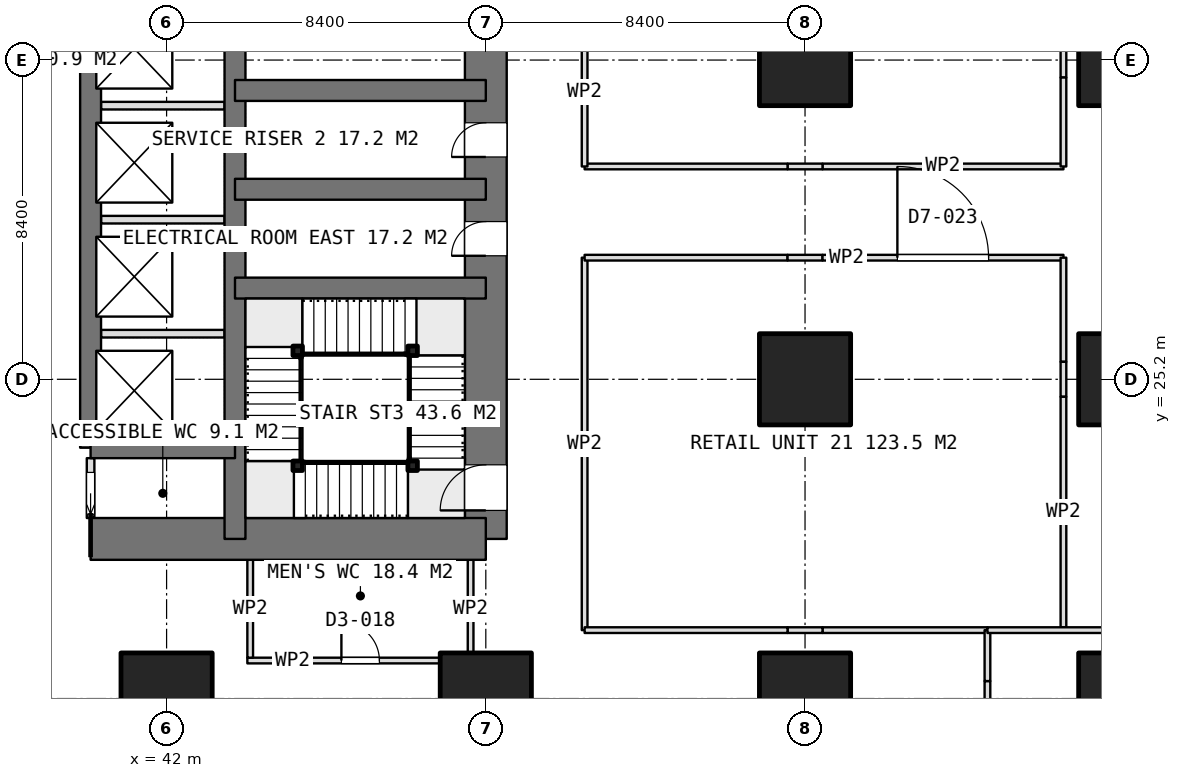
"""IFC4 building model, lengths in metres.
Left out: names, types, materials, properties, quantities, classifications, styles, units other than length and angle.
Written with IfcOpenShell. Run it as: python <this file> out.ifc"""

import sys

from ifc_helpers import new_model, si_unit, direction, frame, frame_2d, origin, origin_2d, place, context, subcontext, project, spatial, rectangle, extrude, element, fill, save


model = new_model("IFC4")
c1 = context("Model", 3, precision=1e-05, world=origin(), true_north=direction((0.0, 1.0)))
c2 = subcontext(c1, "Body", "Model", "MODEL_VIEW")
j1 = project(units=[si_unit("LENGTHUNIT", "METRE"), si_unit("PLANEANGLEUNIT", "RADIAN")], contexts=[c1])
p1 = place(None, origin())
s1 = spatial("IfcSite", under=j1, at=p1, CompositionType="ELEMENT")
p2 = place(p1, origin())
s2 = spatial("IfcBuilding", under=s1, at=p2, CompositionType="ELEMENT")
p3 = place(p2, frame((0.0, 0.0, 10.4)))
s3 = spatial("IfcBuildingStorey", under=s2, at=p3, CompositionType="ELEMENT", Elevation=10.4)
p4 = place(p3, frame((40.0, 21.0, 0.0), z_axis=(0.0, 0.0, 1.0), x_axis=(1.0, 0.0, 0.0)))
e1 = element("IfcWall", 1, at=p4, inside=s3, PredefinedType="SHEAR", context=c2, shape_type="SweptSolid", body=[
    extrude(rectangle(XDim=10.4, YDim=1.1, at=frame_2d((5.2, 0.0))), origin(), (0.0, 0.0, 1.0), 5.0),
])
p5 = place(p3, frame((50.4, 21.0, 0.0), z_axis=(0.0, 0.0, 1.0), x_axis=(0.0, 1.0, 0.0)))
e2 = element("IfcWall", 2, at=p5, inside=s3, PredefinedType="SHEAR", context=c2, shape_type="SweptSolid", body=[
    extrude(rectangle(XDim=25.2, YDim=1.1, at=frame_2d((12.6, 0.0))), origin(), (0.0, 0.0, 1.0), 5.0),
])
p6 = place(p5, frame((16.2, 0.0, 0.0)))
e3 = element("IfcOpeningElement", 3, at=p6, cuts=e2, PredefinedType="OPENING", context=c2, shape_type="SweptSolid", body=[
    extrude(rectangle(XDim=1.2, YDim=2.1, at=frame_2d((0.6, 1.05))), frame((0.0, 0.56, 0.0), z_axis=(0.0, -1.0, 0.0), x_axis=(1.0, 0.0, 0.0)), (0.0, 0.0, 1.0), 1.12),
])
p7 = place(p5, frame((10.05, 0.0, 0.0)))
e4 = element("IfcOpeningElement", 4, at=p7, cuts=e2, PredefinedType="OPENING", context=c2, shape_type="SweptSolid", body=[
    extrude(rectangle(XDim=0.9, YDim=2.1, at=frame_2d((0.45, 1.05))), frame((0.0, 0.56, 0.0), z_axis=(0.0, -1.0, 0.0), x_axis=(1.0, 0.0, 0.0)), (0.0, 0.0, 1.0), 1.12),
])
p8 = place(p5, frame((7.45, 0.0, 0.0)))
e5 = element("IfcOpeningElement", 5, at=p8, cuts=e2, PredefinedType="OPENING", context=c2, shape_type="SweptSolid", body=[
    extrude(rectangle(XDim=0.9, YDim=2.1, at=frame_2d((0.45, 1.05))), frame((0.0, 0.56, 0.0), z_axis=(0.0, -1.0, 0.0), x_axis=(1.0, 0.0, 0.0)), (0.0, 0.0, 1.0), 1.12),
])
p9 = place(p5, frame((0.75, 0.0, 0.0)))
e6 = element("IfcOpeningElement", 6, at=p9, cuts=e2, PredefinedType="OPENING", context=c2, shape_type="SweptSolid", body=[
    extrude(rectangle(XDim=1.2, YDim=2.1, at=frame_2d((0.6, 1.05))), frame((0.0, 0.56, 0.0), z_axis=(0.0, -1.0, 0.0), x_axis=(1.0, 0.0, 0.0)), (0.0, 0.0, 1.0), 1.12),
])
p10 = place(p3, frame((43.8, 21.0, 0.0), z_axis=(0.0, 0.0, 1.0), x_axis=(0.0, 1.0, 0.0)))
e7 = element("IfcWall", 7, at=p10, inside=s3, PredefinedType="SHEAR", context=c2, shape_type="SweptSolid", body=[
    extrude(rectangle(XDim=25.2, YDim=0.55, at=frame_2d((12.6, 0.0))), origin(), (0.0, 0.0, 1.0), 5.0),
])
p11 = place(p3, frame((40.0, 23.4, 0.0), z_axis=(0.0, 0.0, 1.0), x_axis=(0.0, 1.0, 0.0)))
e8 = element("IfcWall", 8, at=p11, inside=s3, PredefinedType="SHEAR", context=c2, shape_type="SweptSolid", body=[
    extrude(rectangle(XDim=18.0, YDim=0.55, at=frame_2d((9.0, 0.0))), origin(), (0.0, 0.0, 1.0), 5.0),
])
p12 = place(p3, frame((40.0, 23.4, 0.0), z_axis=(0.0, 0.0, 1.0), x_axis=(1.0, 0.0, 0.0)))
e9 = element("IfcWall", 9, at=p12, inside=s3, PredefinedType="SHEAR", context=c2, shape_type="SweptSolid", body=[
    extrude(rectangle(XDim=3.8, YDim=0.55, at=frame_2d((1.9, 0.0))), origin(), (0.0, 0.0, 1.0), 5.0),
])
for number, where, z_axis, x_axis in (
    (10, (43.8, 27.6, 0.0), (0.0, 0.0, 1.0), (1.0, 0.0, 0.0)),
    (11, (43.8, 30.2, 0.0), (0.0, 0.0, 1.0), (1.0, 0.0, 0.0)),
    (12, (43.8, 32.8, 0.0), (0.0, 0.0, 1.0), (1.0, 0.0, 0.0)),
):
    element("IfcWall", number, at=place(p3, frame(where, z_axis=z_axis, x_axis=x_axis)), inside=s3, PredefinedType="SHEAR", context=c2, shape_type="SweptSolid", body=[
        extrude(rectangle(XDim=6.6, YDim=0.55, at=frame_2d((3.3, 0.0))), origin(), (0.0, 0.0, 1.0), 5.0),
    ])
for number, where, z_axis, x_axis in (
    (13, (42.0, 16.8, 0.0), (0.0, 0.0, 1.0), (1.0, 0.0, 0.0)),
    (14, (50.4, 16.8, 0.0), (0.0, 0.0, 1.0), (1.0, 0.0, 0.0)),
    (15, (58.8, 16.8, 0.0), (0.0, 0.0, 1.0), (1.0, 0.0, 0.0)),
    (16, (58.8, 25.2, 0.0), (0.0, 0.0, 1.0), (1.0, 0.0, 0.0)),
    (17, (58.8, 33.6, 0.0), (0.0, 0.0, 1.0), (1.0, 0.0, 0.0)),
    (18, (67.2, 16.8, 0.0), (0.0, 0.0, 1.0), (1.0, 0.0, 0.0)),
    (19, (67.2, 25.2, 0.0), (0.0, 0.0, 1.0), (1.0, 0.0, 0.0)),
    (20, (67.2, 33.6, 0.0), (0.0, 0.0, 1.0), (1.0, 0.0, 0.0)),
):
    element("IfcColumn", number, at=place(p3, frame(where, z_axis=z_axis, x_axis=x_axis)), inside=s3, PredefinedType="COLUMN", context=c2, shape_type="SweptSolid", body=[
        extrude(rectangle(XDim=2.4, YDim=2.4, at=origin_2d()), origin(), (0.0, 0.0, 1.0), 5.0),
    ])
for number, where, z_axis, x_axis in (
    (21, (40.275, 26.4, 0.0), (0.0, 0.0, 1.0), (1.0, 0.0, 0.0)),
    (22, (40.275, 29.4, 0.0), (0.0, 0.0, 1.0), (1.0, 0.0, 0.0)),
    (23, (40.275, 32.4, 0.0), (0.0, 0.0, 1.0), (1.0, 0.0, 0.0)),
):
    element("IfcWall", number, at=place(p3, frame(where, z_axis=z_axis, x_axis=x_axis)), inside=s3, PredefinedType="PARTITIONING", context=c2, shape_type="SweptSolid", body=[
        extrude(rectangle(XDim=3.25, YDim=0.2, at=frame_2d((1.625, 0.0))), origin(), (0.0, 0.0, 1.0), 4.7),
    ])
p13 = place(p3, frame((40.0, 21.55, 0.0), z_axis=(0.0, 0.0, 1.0), x_axis=(0.0, 1.0, 0.0)))
e24 = element("IfcWall", 24, at=p13, inside=s3, PredefinedType="PARTITIONING", context=c2, shape_type="SweptSolid", body=[
    extrude(rectangle(XDim=1.575, YDim=0.2, at=frame_2d((0.788, 0.0))), origin(), (0.0, 0.0, 1.0), 4.7),
])
p14 = place(p13, frame((0.1, 0.0, 0.0)))
e25 = element("IfcOpeningElement", 25, at=p14, cuts=e24, PredefinedType="OPENING", context=c2, shape_type="SweptSolid", body=[
    extrude(rectangle(XDim=1.1, YDim=2.1, at=frame_2d((0.55, 1.05))), frame((0.0, 0.11, 0.0), z_axis=(0.0, -1.0, 0.0), x_axis=(1.0, 0.0, 0.0)), (0.0, 0.0, 1.0), 0.22),
])
p15 = place(p3, frame((44.125, 17.8, 0.0), z_axis=(0.0, 0.0, 1.0), x_axis=(1.0, 0.0, 0.0)))
e26 = element("IfcWall", 26, at=p15, inside=s3, PredefinedType="PARTITIONING", context=c2, shape_type="SweptSolid", body=[
    extrude(rectangle(XDim=5.95, YDim=0.15, at=frame_2d((2.975, 0.0))), origin(), (0.0, 0.0, 1.0), 4.7),
])
p16 = place(p15, frame((2.475, 0.0, 0.0)))
e27 = element("IfcOpeningElement", 27, at=p16, cuts=e26, PredefinedType="OPENING", context=c2, shape_type="SweptSolid", body=[
    extrude(rectangle(XDim=1.0, YDim=2.1, at=frame_2d((0.5, 1.05))), frame((0.0, 0.085, 0.0), z_axis=(0.0, -1.0, 0.0), x_axis=(1.0, 0.0, 0.0)), (0.0, 0.0, 1.0), 0.17),
])
for number, where, z_axis, x_axis in (
    (28, (44.2, 17.875, 0.0), (0.0, 0.0, 1.0), (0.0, 1.0, 0.0)),
    (29, (50.0, 17.875, 0.0), (0.0, 0.0, 1.0), (0.0, 1.0, 0.0)),
):
    element("IfcWall", number, at=place(p3, frame(where, z_axis=z_axis, x_axis=x_axis)), inside=s3, PredefinedType="PARTITIONING", context=c2, shape_type="SweptSolid", body=[
        extrude(rectangle(XDim=2.575, YDim=0.15, at=frame_2d((1.288, 0.0))), origin(), (0.0, 0.0, 1.0), 4.7),
    ])
p17 = place(p3, frame((63.6, 16.34, 0.0), z_axis=(0.0, 0.0, 1.0), x_axis=(0.0, 1.0, 0.0)))
e30 = element("IfcWall", 30, at=p17, inside=s3, PredefinedType="PARTITIONING", context=c2, shape_type="SweptSolid", body=[
    extrude(rectangle(XDim=0.92, YDim=0.15, at=frame_2d((0.46, 0.0))), origin(), (0.0, 0.0, 1.0), 2.9),
])
p18 = place(p3, frame((63.6, 17.26, 0.0), z_axis=(0.0, 0.0, 1.0), x_axis=(0.0, 1.0, 0.0)))
e31 = element("IfcWall", 31, at=p18, inside=s3, PredefinedType="PARTITIONING", context=c2, shape_type="SweptSolid", body=[
    extrude(rectangle(XDim=1.34, YDim=0.15, at=frame_2d((0.67, 0.0))), origin(), (0.0, 0.0, 1.0), 4.7),
])
p19 = place(p3, frame((63.6, 18.6, 0.0), z_axis=(0.0, 0.0, 1.0), x_axis=(1.0, 0.0, 0.0)))
e32 = element("IfcWall", 32, at=p19, inside=s3, PredefinedType="PARTITIONING", context=c2, shape_type="SweptSolid", body=[
    extrude(rectangle(XDim=3.14, YDim=0.15, at=frame_2d((1.57, 0.0))), origin(), (0.0, 0.0, 1.0), 4.7),
])
p20 = place(p3, frame((53.0, 18.6, 0.0), z_axis=(0.0, 0.0, 1.0), x_axis=(0.0, 1.0, 0.0)))
e33 = element("IfcWall", 33, at=p20, inside=s3, PredefinedType="PARTITIONING", context=c2, shape_type="SweptSolid", body=[
    extrude(rectangle(XDim=9.8, YDim=0.15, at=frame_2d((4.9, 0.0))), origin(), (0.0, 0.0, 1.0), 4.7),
])
p21 = place(p3, frame((53.0, 28.4, 0.0), z_axis=(0.0, 0.0, 1.0), x_axis=(1.0, 0.0, 0.0)))
e34 = element("IfcWall", 34, at=p21, inside=s3, PredefinedType="PARTITIONING", context=c2, shape_type="SweptSolid", body=[
    extrude(rectangle(XDim=5.34, YDim=0.15, at=frame_2d((2.67, 0.0))), origin(), (0.0, 0.0, 1.0), 4.7),
])
p22 = place(p3, frame((58.34, 28.4, 0.0), z_axis=(0.0, 0.0, 1.0), x_axis=(1.0, 0.0, 0.0)))
e35 = element("IfcWall", 35, at=p22, inside=s3, PredefinedType="PARTITIONING", context=c2, shape_type="SweptSolid", body=[
    extrude(rectangle(XDim=0.92, YDim=0.15, at=frame_2d((0.46, 0.0))), origin(), (0.0, 0.0, 1.0), 2.9),
])
p23 = place(p3, frame((59.26, 28.4, 0.0), z_axis=(0.0, 0.0, 1.0), x_axis=(1.0, 0.0, 0.0)))
e36 = element("IfcWall", 36, at=p23, inside=s3, PredefinedType="PARTITIONING", context=c2, shape_type="SweptSolid", body=[
    extrude(rectangle(XDim=6.34, YDim=0.15, at=frame_2d((3.17, 0.0))), origin(), (0.0, 0.0, 1.0), 4.7),
])
p24 = place(p23, frame((1.97, 0.0, 0.0)))
e37 = element("IfcOpeningElement", 37, at=p24, cuts=e36, PredefinedType="OPENING", context=c2, shape_type="SweptSolid", body=[
    extrude(rectangle(XDim=2.4, YDim=2.4, at=frame_2d((1.2, 1.2))), frame((0.0, 0.085, 0.0), z_axis=(0.0, -1.0, 0.0), x_axis=(1.0, 0.0, 0.0)), (0.0, 0.0, 1.0), 0.17),
])
p25 = place(p3, frame((65.6, 28.4, 0.0), z_axis=(0.0, 0.0, 1.0), x_axis=(0.0, -1.0, 0.0)))
e38 = element("IfcWall", 38, at=p25, inside=s3, PredefinedType="PARTITIONING", context=c2, shape_type="SweptSolid", body=[
    extrude(rectangle(XDim=2.74, YDim=0.15, at=frame_2d((1.37, 0.0))), origin(), (0.0, 0.0, 1.0), 4.7),
])
p26 = place(p3, frame((65.6, 25.66, 0.0), z_axis=(0.0, 0.0, 1.0), x_axis=(0.0, -1.0, 0.0)))
e39 = element("IfcWall", 39, at=p26, inside=s3, PredefinedType="PARTITIONING", context=c2, shape_type="SweptSolid", body=[
    extrude(rectangle(XDim=0.92, YDim=0.15, at=frame_2d((0.46, 0.0))), origin(), (0.0, 0.0, 1.0), 2.9),
])
p27 = place(p3, frame((65.6, 24.74, 0.0), z_axis=(0.0, 0.0, 1.0), x_axis=(0.0, -1.0, 0.0)))
e40 = element("IfcWall", 40, at=p27, inside=s3, PredefinedType="PARTITIONING", context=c2, shape_type="SweptSolid", body=[
    extrude(rectangle(XDim=6.065, YDim=0.15, at=frame_2d((3.032, 0.0))), origin(), (0.0, 0.0, 1.0), 4.7),
])
p28 = place(p3, frame((63.6, 18.6, 0.0), z_axis=(0.0, 0.0, 1.0), x_axis=(-1.0, 0.0, 0.0)))
e41 = element("IfcWall", 41, at=p28, inside=s3, PredefinedType="PARTITIONING", context=c2, shape_type="SweptSolid", body=[
    extrude(rectangle(XDim=4.34, YDim=0.15, at=frame_2d((2.17, 0.0))), origin(), (0.0, 0.0, 1.0), 4.7),
])
p29 = place(p3, frame((59.26, 18.6, 0.0), z_axis=(0.0, 0.0, 1.0), x_axis=(-1.0, 0.0, 0.0)))
e42 = element("IfcWall", 42, at=p29, inside=s3, PredefinedType="PARTITIONING", context=c2, shape_type="SweptSolid", body=[
    extrude(rectangle(XDim=0.92, YDim=0.15, at=frame_2d((0.46, 0.0))), origin(), (0.0, 0.0, 1.0), 2.9),
])
p30 = place(p3, frame((58.34, 18.6, 0.0), z_axis=(0.0, 0.0, 1.0), x_axis=(-1.0, 0.0, 0.0)))
e43 = element("IfcWall", 43, at=p30, inside=s3, PredefinedType="PARTITIONING", context=c2, shape_type="SweptSolid", body=[
    extrude(rectangle(XDim=5.34, YDim=0.15, at=frame_2d((2.67, 0.0))), origin(), (0.0, 0.0, 1.0), 4.7),
])
p31 = place(p3, frame((65.6, 30.8, 0.0), z_axis=(0.0, 0.0, 1.0), x_axis=(-1.0, 0.0, 0.0)))
e44 = element("IfcWall", 44, at=p31, inside=s3, PredefinedType="PARTITIONING", context=c2, shape_type="SweptSolid", body=[
    extrude(rectangle(XDim=6.34, YDim=0.15, at=frame_2d((3.17, 0.0))), origin(), (0.0, 0.0, 1.0), 4.7),
])
p32 = place(p3, frame((59.26, 30.8, 0.0), z_axis=(0.0, 0.0, 1.0), x_axis=(-1.0, 0.0, 0.0)))
e45 = element("IfcWall", 45, at=p32, inside=s3, PredefinedType="PARTITIONING", context=c2, shape_type="SweptSolid", body=[
    extrude(rectangle(XDim=0.92, YDim=0.15, at=frame_2d((0.46, 0.0))), origin(), (0.0, 0.0, 1.0), 2.9),
])
p33 = place(p3, frame((58.34, 30.8, 0.0), z_axis=(0.0, 0.0, 1.0), x_axis=(-1.0, 0.0, 0.0)))
e46 = element("IfcWall", 46, at=p33, inside=s3, PredefinedType="PARTITIONING", context=c2, shape_type="SweptSolid", body=[
    extrude(rectangle(XDim=5.34, YDim=0.15, at=frame_2d((2.67, 0.0))), origin(), (0.0, 0.0, 1.0), 4.7),
])
p34 = place(p3, frame((53.0, 30.8, 0.0), z_axis=(0.0, 0.0, 1.0), x_axis=(0.0, 1.0, 0.0)))
e47 = element("IfcWall", 47, at=p34, inside=s3, PredefinedType="PARTITIONING", context=c2, shape_type="SweptSolid", body=[
    extrude(rectangle(XDim=9.8, YDim=0.15, at=frame_2d((4.9, 0.0))), origin(), (0.0, 0.0, 1.0), 4.7),
])
p35 = place(p34, frame((3.7, 0.0, 0.0)))
e48 = element("IfcOpeningElement", 48, at=p35, cuts=e47, PredefinedType="OPENING", context=c2, shape_type="SweptSolid", body=[
    extrude(rectangle(XDim=2.4, YDim=2.4, at=frame_2d((1.2, 1.2))), frame((0.0, 0.085, 0.0), z_axis=(0.0, -1.0, 0.0), x_axis=(1.0, 0.0, 0.0)), (0.0, 0.0, 1.0), 0.17),
])
p36 = place(p3, frame((65.6, 34.06, 0.0), z_axis=(0.0, 0.0, 1.0), x_axis=(0.0, -1.0, 0.0)))
e49 = element("IfcWall", 49, at=p36, inside=s3, PredefinedType="PARTITIONING", context=c2, shape_type="SweptSolid", body=[
    extrude(rectangle(XDim=0.92, YDim=0.15, at=frame_2d((0.46, 0.0))), origin(), (0.0, 0.0, 1.0), 2.9),
])
p37 = place(p3, frame((65.6, 33.14, 0.0), z_axis=(0.0, 0.0, 1.0), x_axis=(0.0, -1.0, 0.0)))
e50 = element("IfcWall", 50, at=p37, inside=s3, PredefinedType="PARTITIONING", context=c2, shape_type="SweptSolid", body=[
    extrude(rectangle(XDim=2.34, YDim=0.15, at=frame_2d((1.17, 0.0))), origin(), (0.0, 0.0, 1.0), 4.7),
])
for number, where, z_axis, x_axis in (
    (51, (48.475, 22.925, 0.0), (0.0, 0.0, 1.0), (1.0, 0.0, 0.0)),
    (52, (45.45, 22.925, 0.0), (0.0, 0.0, 1.0), (1.0, 0.0, 0.0)),
    (53, (45.45, 25.95, 0.0), (0.0, 0.0, 1.0), (1.0, 0.0, 0.0)),
    (54, (48.475, 25.95, 0.0), (0.0, 0.0, 1.0), (1.0, 0.0, 0.0)),
):
    element("IfcColumn", number, at=place(p3, frame(where, z_axis=z_axis, x_axis=x_axis)), inside=s3, PredefinedType="COLUMN", context=c2, shape_type="SweptSolid", body=[
        extrude(rectangle(XDim=0.25, YDim=0.25, at=origin_2d()), origin(), (0.0, 0.0, 1.0), 5.0),
    ])
p38 = place(p7, origin())
e55 = element("IfcDoor", 55, at=p38, inside=s3, OperationType="SINGLE_SWING_LEFT", PredefinedType="DOOR", context=c2, shape_type="SweptSolid", body=[
    extrude(rectangle(XDim=0.9, YDim=2.1, at=frame_2d((0.45, 1.05))), frame((0.0, 0.025, 0.0), z_axis=(0.0, -1.0, 0.0), x_axis=(1.0, 0.0, 0.0)), (0.0, 0.0, 1.0), 0.05),
])
fill(e4, e55)
p39 = place(p8, origin())
e56 = element("IfcDoor", 56, at=p39, inside=s3, OperationType="SINGLE_SWING_LEFT", PredefinedType="DOOR", context=c2, shape_type="SweptSolid", body=[
    extrude(rectangle(XDim=0.9, YDim=2.1, at=frame_2d((0.45, 1.05))), frame((0.0, 0.025, 0.0), z_axis=(0.0, -1.0, 0.0), x_axis=(1.0, 0.0, 0.0)), (0.0, 0.0, 1.0), 0.05),
])
fill(e5, e56)
p40 = place(p14, origin())
e57 = element("IfcDoor", 57, at=p40, inside=s3, OperationType="SLIDING_TO_LEFT", PredefinedType="DOOR", context=c2, shape_type="SweptSolid", body=[
    extrude(rectangle(XDim=1.1, YDim=2.1, at=frame_2d((0.55, 1.05))), frame((0.0, 0.025, 0.0), z_axis=(0.0, -1.0, 0.0), x_axis=(1.0, 0.0, 0.0)), (0.0, 0.0, 1.0), 0.05),
])
fill(e25, e57)
p41 = place(p16, origin())
e58 = element("IfcDoor", 58, at=p41, inside=s3, OperationType="SINGLE_SWING_LEFT", PredefinedType="DOOR", context=c2, shape_type="SweptSolid", body=[
    extrude(rectangle(XDim=1.0, YDim=2.1, at=frame_2d((0.5, 1.05))), frame((0.0, 0.025, 0.0), z_axis=(0.0, -1.0, 0.0), x_axis=(1.0, 0.0, 0.0)), (0.0, 0.0, 1.0), 0.05),
])
fill(e27, e58)
p42 = place(p24, origin())
e59 = element("IfcDoor", 59, at=p42, inside=s3, OperationType="DOUBLE_DOOR_SINGLE_SWING", PredefinedType="DOOR", context=c2, shape_type="SweptSolid", body=[
    extrude(rectangle(XDim=2.4, YDim=2.4, at=frame_2d((1.2, 1.2))), frame((0.0, 0.025, 0.0), z_axis=(0.0, -1.0, 0.0), x_axis=(1.0, 0.0, 0.0)), (0.0, 0.0, 1.0), 0.05),
])
fill(e37, e59)
p43 = place(p9, origin())
e60 = element("IfcDoor", 60, at=p43, inside=s3, OperationType="SINGLE_SWING_RIGHT", PredefinedType="DOOR", context=c2, shape_type="SweptSolid", body=[
    extrude(rectangle(XDim=1.2, YDim=2.1, at=frame_2d((0.6, 1.05))), frame((0.0, 0.025, 0.0), z_axis=(0.0, -1.0, 0.0), x_axis=(1.0, 0.0, 0.0)), (0.0, 0.0, 1.0), 0.05),
])
fill(e6, e60)
save(model, sys.argv[1])
